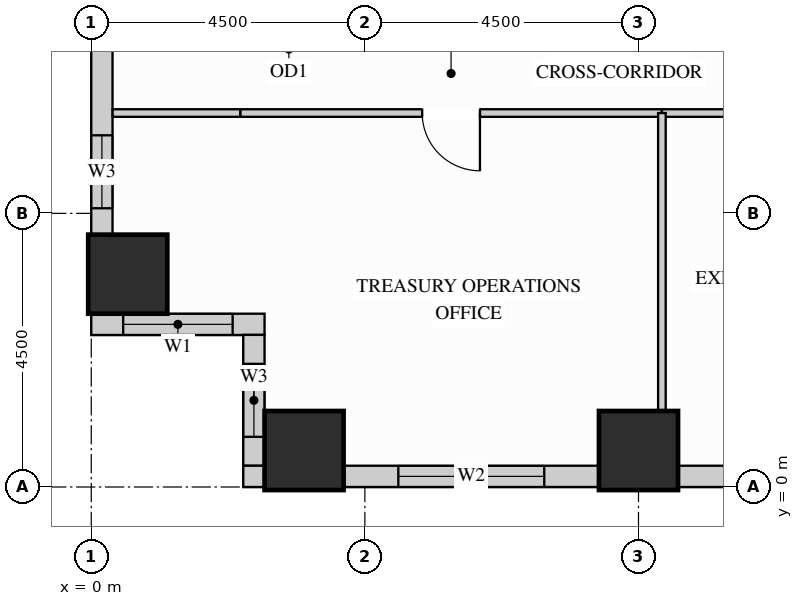
"""IFC4 building model, lengths in metres.
Left out: names, types, materials, properties, quantities, classifications, styles, units other than length and angle.
Written with IfcOpenShell. Run it as: python <this file> out.ifc"""

import sys

from ifc_helpers import new_model, si_unit, direction, frame, frame_2d, origin, origin_2d, place, context, subcontext, project, spatial, rectangle, extrude, source, transform, mapped, element, fill, save


model = new_model("IFC4")
c1 = context("Model", 3, precision=1e-05, world=origin(), true_north=direction((0.0, 1.0)))
c2 = subcontext(c1, "Body", "Model", "MODEL_VIEW")
j1 = project(units=[si_unit("LENGTHUNIT", "METRE"), si_unit("PLANEANGLEUNIT", "RADIAN")], contexts=[c1])
p1 = place(None, origin())
s1 = spatial("IfcSite", under=j1, at=p1, CompositionType="ELEMENT")
p2 = place(p1, origin())
s2 = spatial("IfcBuilding", under=s1, at=p2, CompositionType="ELEMENT")
p3 = place(p2, frame((0.0, 0.0, 40.5)))
s3 = spatial("IfcBuildingStorey", under=s2, at=p3, CompositionType="ELEMENT", Elevation=40.5)
m1 = source(origin(), c2, "Body", "SweptSolid", [
    extrude(rectangle(XDim=1.3, YDim=1.3, at=origin_2d()), origin(), (0.0, 0.0, 1.0), 3.38),
])
for number, where, z_axis, x_axis in (
    (1, (3.5, 0.6, 0.0), (0.0, 0.0, 1.0), (1.0, 0.0, 0.0)),
    (2, (9.0, 0.6, 0.0), (0.0, 0.0, 1.0), (1.0, 0.0, 0.0)),
    (3, (0.6, 3.5, 0.0), (0.0, 0.0, 1.0), (1.0, 0.0, 0.0)),
):
    element("IfcColumn", number, at=place(p3, frame(where, z_axis=z_axis, x_axis=x_axis)), inside=s3, PredefinedType="COLUMN", context=c2, shape_type="MappedRepresentation", body=[
        mapped(m1, transform((0.0, 0.0, 0.0), x_axis=(1.0, 0.0, 0.0), y_axis=(0.0, 1.0, 0.0), z_axis=(0.0, 0.0, 1.0))),
    ])
p4 = place(p3, frame((0.175, 7.852, 0.0), z_axis=(0.0, 0.0, 1.0), x_axis=(0.0, -1.0, 0.0)))
e4 = element("IfcWall", 4, at=p4, inside=s3, PredefinedType="SOLIDWALL", context=c2, shape_type="SweptSolid", body=[
    extrude(rectangle(XDim=3.704, YDim=0.35, at=frame_2d((1.852, 0.0))), origin(), (0.0, 0.0, 1.0), 2.51),
])
p5 = place(p4, frame((2.068, 0.0, 0.78)))
e5 = element("IfcOpeningElement", 5, at=p5, cuts=e4, PredefinedType="OPENING", context=c2, shape_type="SweptSolid", body=[
    extrude(rectangle(XDim=1.2, YDim=1.55, at=frame_2d((0.6, 0.775))), frame((0.0, 0.185, 0.0), z_axis=(0.0, -1.0, 0.0), x_axis=(1.0, 0.0, 0.0)), (0.0, 0.0, 1.0), 0.37),
])
p6 = place(p3, frame((0.0, 2.675, 0.0), z_axis=(0.0, 0.0, 1.0), x_axis=(1.0, 0.0, 0.0)))
e6 = element("IfcWall", 6, at=p6, inside=s3, PredefinedType="SOLIDWALL", context=c2, shape_type="SweptSolid", body=[
    extrude(rectangle(XDim=2.85, YDim=0.35, at=frame_2d((1.425, 0.0))), origin(), (0.0, 0.0, 1.0), 3.365),
])
p7 = place(p6, frame((0.525, 0.0, 0.78)))
e7 = element("IfcOpeningElement", 7, at=p7, cuts=e6, PredefinedType="OPENING", context=c2, shape_type="SweptSolid", body=[
    extrude(rectangle(XDim=1.8, YDim=2.1, at=frame_2d((0.9, 1.05))), frame((0.0, 0.185, 0.0), z_axis=(0.0, -1.0, 0.0), x_axis=(1.0, 0.0, 0.0)), (0.0, 0.0, 1.0), 0.37),
])
p8 = place(p3, frame((2.675, 2.502, 0.0), z_axis=(0.0, 0.0, 1.0), x_axis=(0.0, -1.0, 0.0)))
e8 = element("IfcWall", 8, at=p8, inside=s3, PredefinedType="SOLIDWALL", context=c2, shape_type="SweptSolid", body=[
    extrude(rectangle(XDim=2.154, YDim=0.35, at=frame_2d((1.077, 0.0))), origin(), (0.0, 0.0, 1.0), 3.365),
])
p9 = place(p8, frame((0.477, 0.0, 0.78)))
e9 = element("IfcOpeningElement", 9, at=p9, cuts=e8, PredefinedType="OPENING", context=c2, shape_type="SweptSolid", body=[
    extrude(rectangle(XDim=1.2, YDim=2.1, at=frame_2d((0.6, 1.05))), frame((0.0, 0.185, 0.0), z_axis=(0.0, -1.0, 0.0), x_axis=(1.0, 0.0, 0.0)), (0.0, 0.0, 1.0), 0.37),
])
m2 = source(origin(), c2, "Body", "SweptSolid", [
    extrude(rectangle(XDim=0.352, YDim=0.35, at=frame_2d((0.176, 0.0))), origin(), (0.0, 0.0, 1.0), 3.365),
])
p10 = place(p3, frame((2.5, 0.175, 0.0), z_axis=(0.0, 0.0, 1.0), x_axis=(1.0, 0.0, 0.0)))
e10 = element("IfcWall", 10, at=p10, inside=s3, PredefinedType="SOLIDWALL", context=c2, shape_type="MappedRepresentation", body=[
    mapped(m2, transform((0.0, 0.0, 0.0), x_axis=(1.0, 0.0, 0.0), y_axis=(0.0, 1.0, 0.0), z_axis=(0.0, 0.0, 1.0))),
])
p11 = place(p3, frame((4.148, 0.175, 0.0), z_axis=(0.0, 0.0, 1.0), x_axis=(1.0, 0.0, 0.0)))
e11 = element("IfcWall", 11, at=p11, inside=s3, PredefinedType="SOLIDWALL", context=c2, shape_type="SweptSolid", body=[
    extrude(rectangle(XDim=4.204, YDim=0.35, at=frame_2d((2.102, 0.0))), origin(), (0.0, 0.0, 1.0), 2.51),
])
p12 = place(p11, frame((0.902, 0.0, 0.78)))
e12 = element("IfcOpeningElement", 12, at=p12, cuts=e11, PredefinedType="OPENING", context=c2, shape_type="SweptSolid", body=[
    extrude(rectangle(XDim=2.4, YDim=1.55, at=frame_2d((1.2, 0.775))), frame((0.0, 0.185, 0.0), z_axis=(0.0, -1.0, 0.0), x_axis=(1.0, 0.0, 0.0)), (0.0, 0.0, 1.0), 0.37),
])
p13 = place(p3, frame((9.648, 0.175, 0.0), z_axis=(0.0, 0.0, 1.0), x_axis=(1.0, 0.0, 0.0)))
e13 = element("IfcWall", 13, at=p13, inside=s3, PredefinedType="SOLIDWALL", context=c2, shape_type="SweptSolid", body=[
    extrude(rectangle(XDim=4.204, YDim=0.35, at=frame_2d((2.102, 0.0))), origin(), (0.0, 0.0, 1.0), 2.51),
])
p14 = place(p13, frame((0.902, 0.0, 0.78)))
e14 = element("IfcOpeningElement", 14, at=p14, cuts=e13, PredefinedType="OPENING", context=c2, shape_type="SweptSolid", body=[
    extrude(rectangle(XDim=2.4, YDim=1.55, at=frame_2d((1.2, 0.775))), frame((0.0, 0.185, 0.0), z_axis=(0.0, -1.0, 0.0), x_axis=(1.0, 0.0, 0.0)), (0.0, 0.0, 1.0), 0.37),
])
p15 = place(p3, frame((2.45, 6.15, 0.0), z_axis=(0.0, 0.0, 1.0), x_axis=(1.0, 0.0, 0.0)))
e15 = element("IfcWall", 15, at=p15, inside=s3, PredefinedType="PARTITIONING", context=c2, shape_type="SweptSolid", body=[
    extrude(rectangle(XDim=6.935, YDim=0.125, at=frame_2d((3.468, 0.0))), origin(), (0.0, 0.0, 1.0), 3.365),
])
p16 = place(p15, frame((2.992, 0.0, 0.0)))
e16 = element("IfcOpeningElement", 16, at=p16, cuts=e15, PredefinedType="OPENING", context=c2, shape_type="SweptSolid", body=[
    extrude(rectangle(XDim=0.95, YDim=2.15, at=frame_2d((0.475, 1.075))), frame((0.0, 0.073, 0.0), z_axis=(0.0, -1.0, 0.0), x_axis=(1.0, 0.0, 0.0)), (0.0, 0.0, 1.0), 0.145),
])
p17 = place(p3, frame((9.385, 6.15, 0.0), z_axis=(0.0, 0.0, 1.0), x_axis=(1.0, 0.0, 0.0)))
e17 = element("IfcWall", 17, at=p17, inside=s3, PredefinedType="PARTITIONING", context=c2, shape_type="SweptSolid", body=[
    extrude(rectangle(XDim=7.665, YDim=0.125, at=frame_2d((3.833, 0.0))), origin(), (0.0, 0.0, 1.0), 3.365),
])
p18 = place(p17, frame((3.357, 0.0, 0.0)))
e18 = element("IfcOpeningElement", 18, at=p18, cuts=e17, PredefinedType="OPENING", context=c2, shape_type="SweptSolid", body=[
    extrude(rectangle(XDim=0.95, YDim=2.15, at=frame_2d((0.475, 1.075))), frame((0.0, 0.073, 0.0), z_axis=(0.0, -1.0, 0.0), x_axis=(1.0, 0.0, 0.0)), (0.0, 0.0, 1.0), 0.145),
])
m3 = source(origin(), c2, "Body", "SweptSolid", [
    extrude(rectangle(XDim=2.098, YDim=0.125, at=frame_2d((1.049, 0.0))), origin(), (0.0, 0.0, 1.0), 3.365),
])
p19 = place(p3, frame((0.352, 6.15, 0.0), z_axis=(0.0, 0.0, 1.0), x_axis=(1.0, 0.0, 0.0)))
e19 = element("IfcWall", 19, at=p19, inside=s3, PredefinedType="PARTITIONING", context=c2, shape_type="MappedRepresentation", body=[
    mapped(m3, transform((0.0, 0.0, 0.0), x_axis=(1.0, 0.0, 0.0), y_axis=(0.0, 1.0, 0.0), z_axis=(0.0, 0.0, 1.0))),
])
m4 = source(origin(), c2, "Body", "SweptSolid", [
    extrude(rectangle(XDim=4.89, YDim=0.125, at=frame_2d((2.445, 0.0))), origin(), (0.0, 0.0, 1.0), 3.365),
])
p20 = place(p3, frame((9.385, 1.26, 0.0), z_axis=(0.0, 0.0, 1.0), x_axis=(0.0, 1.0, 0.0)))
e20 = element("IfcWall", 20, at=p20, inside=s3, PredefinedType="PARTITIONING", context=c2, shape_type="MappedRepresentation", body=[
    mapped(m4, transform((0.0, 0.0, 0.0), x_axis=(1.0, 0.0, 0.0), y_axis=(0.0, 1.0, 0.0), z_axis=(0.0, 0.0, 1.0))),
])
m5 = source(origin(), c2, "Body", "SweptSolid", [
    extrude(rectangle(XDim=0.95, YDim=2.15, at=frame_2d((0.475, 1.075))), frame((0.0, 0.025, 0.0), z_axis=(0.0, -1.0, 0.0), x_axis=(1.0, 0.0, 0.0)), (0.0, 0.0, 1.0), 0.05),
])
p21 = place(p16, origin())
e21 = element("IfcDoor", 21, at=p21, inside=s3, OperationType="SINGLE_SWING_RIGHT", PredefinedType="DOOR", context=c2, shape_type="MappedRepresentation", body=[
    mapped(m5, transform((0.0, 0.0, 0.0), x_axis=(1.0, 0.0, 0.0), y_axis=(0.0, 1.0, 0.0), z_axis=(0.0, 0.0, 1.0))),
])
fill(e16, e21)
m6 = source(origin(), c2, "Body", "SweptSolid", [
    extrude(rectangle(XDim=1.8, YDim=2.1, at=frame_2d((0.9, 1.05))), frame((0.0, 0.03, 0.0), z_axis=(0.0, -1.0, 0.0), x_axis=(1.0, 0.0, 0.0)), (0.0, 0.0, 1.0), 0.06),
])
p22 = place(p7, origin())
e22 = element("IfcWindow", 22, at=p22, inside=s3, PartitioningType="SINGLE_PANEL", PredefinedType="WINDOW", context=c2, shape_type="MappedRepresentation", body=[
    mapped(m6, transform((0.0, 0.0, 0.0), x_axis=(1.0, 0.0, 0.0), y_axis=(0.0, 1.0, 0.0), z_axis=(0.0, 0.0, 1.0))),
])
fill(e7, e22)
m7 = source(origin(), c2, "Body", "SweptSolid", [
    extrude(rectangle(XDim=2.4, YDim=1.55, at=frame_2d((1.2, 0.775))), frame((0.0, 0.03, 0.0), z_axis=(0.0, -1.0, 0.0), x_axis=(1.0, 0.0, 0.0)), (0.0, 0.0, 1.0), 0.06),
])
p23 = place(p12, origin())
e23 = element("IfcWindow", 23, at=p23, inside=s3, PartitioningType="SINGLE_PANEL", PredefinedType="WINDOW", context=c2, shape_type="MappedRepresentation", body=[
    mapped(m7, transform((0.0, 0.0, 0.0), x_axis=(1.0, 0.0, 0.0), y_axis=(0.0, 1.0, 0.0), z_axis=(0.0, 0.0, 1.0))),
])
fill(e12, e23)
m8 = source(origin(), c2, "Body", "SweptSolid", [
    extrude(rectangle(XDim=1.2, YDim=1.55, at=frame_2d((0.6, 0.775))), frame((0.0, 0.03, 0.0), z_axis=(0.0, -1.0, 0.0), x_axis=(1.0, 0.0, 0.0)), (0.0, 0.0, 1.0), 0.06),
])
p24 = place(p5, origin())
e24 = element("IfcWindow", 24, at=p24, inside=s3, PartitioningType="SINGLE_PANEL", PredefinedType="WINDOW", context=c2, shape_type="MappedRepresentation", body=[
    mapped(m8, transform((0.0, 0.0, 0.0), x_axis=(1.0, 0.0, 0.0), y_axis=(0.0, 1.0, 0.0), z_axis=(0.0, 0.0, 1.0))),
])
fill(e5, e24)
m9 = source(origin(), c2, "Body", "SweptSolid", [
    extrude(rectangle(XDim=1.2, YDim=2.1, at=frame_2d((0.6, 1.05))), frame((0.0, 0.03, 0.0), z_axis=(0.0, -1.0, 0.0), x_axis=(1.0, 0.0, 0.0)), (0.0, 0.0, 1.0), 0.06),
])
p25 = place(p9, origin())
e25 = element("IfcWindow", 25, at=p25, inside=s3, PartitioningType="SINGLE_PANEL", PredefinedType="WINDOW", context=c2, shape_type="MappedRepresentation", body=[
    mapped(m9, transform((0.0, 0.0, 0.0), x_axis=(1.0, 0.0, 0.0), y_axis=(0.0, 1.0, 0.0), z_axis=(0.0, 0.0, 1.0))),
])
fill(e9, e25)
save(model, sys.argv[1])
